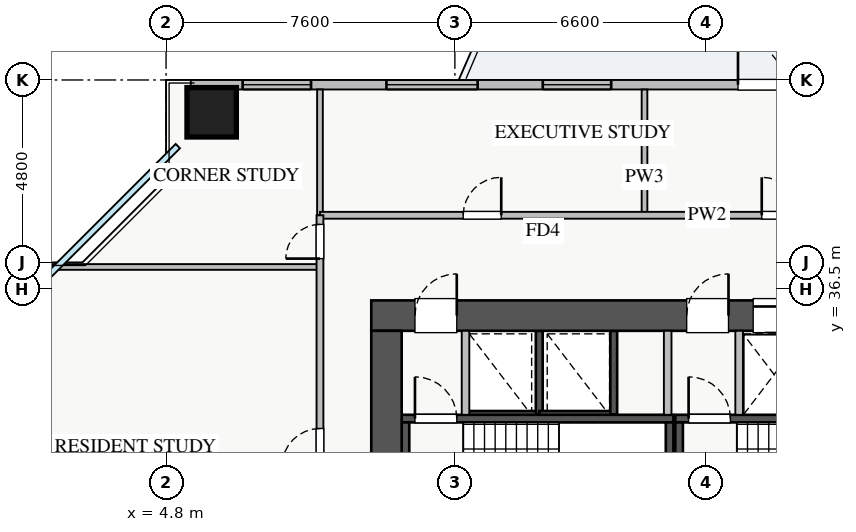
"""IFC4 building model, lengths in metres.
Left out: names, types, materials, properties, quantities, classifications, styles, units other than length and angle.
Written with IfcOpenShell. Run it as: python <this file> out.ifc"""

import sys

from ifc_helpers import new_model, si_unit, direction, frame, frame_2d, origin, origin_2d, place, context, subcontext, project, spatial, rectangle, extrude, source, transform, mapped, element, fill, save


model = new_model("IFC4")
c1 = context("Model", 3, precision=1e-05, world=origin(), true_north=direction((0.0, 1.0)))
c2 = subcontext(c1, "Body", "Model", "MODEL_VIEW")
j1 = project(units=[si_unit("LENGTHUNIT", "METRE"), si_unit("PLANEANGLEUNIT", "RADIAN")], contexts=[c1])
p1 = place(None, origin())
s1 = spatial("IfcSite", under=j1, at=p1, CompositionType="ELEMENT")
p2 = place(p1, origin())
s2 = spatial("IfcBuilding", under=s1, at=p2, CompositionType="ELEMENT")
p3 = place(p2, frame((0.0, 0.0, 32.75)))
s3 = spatial("IfcBuildingStorey", under=s2, at=p3, CompositionType="ELEMENT", Elevation=32.75)
p4 = place(p3, frame((12.68, 33.2, 0.0), z_axis=(0.0, 0.0, 1.0), x_axis=(1.0, 0.0, 0.0)))
e1 = element("IfcWall", 1, at=p4, inside=s3, PredefinedType="SHEAR", context=c2, shape_type="SweptSolid", body=[
    extrude(rectangle(XDim=1.94, YDim=0.18, at=frame_2d((0.97, 0.0))), origin(), (0.0, 0.0, 1.0), 3.07),
])
p5 = place(p3, frame((14.62, 33.2, 0.0), z_axis=(0.0, 0.0, 1.0), x_axis=(0.0, 1.0, 0.0)))
e2 = element("IfcWall", 2, at=p5, inside=s3, PredefinedType="SHEAR", context=c2, shape_type="SweptSolid", body=[
    extrude(rectangle(XDim=2.2, YDim=0.18, at=frame_2d((1.1, 0.0))), origin(), (0.0, 0.0, 1.0), 3.07),
])
p6 = place(p3, frame((14.62, 33.2, 0.0), z_axis=(0.0, 0.0, 1.0), x_axis=(1.0, 0.0, 0.0)))
e3 = element("IfcWall", 3, at=p6, inside=s3, PredefinedType="SHEAR", context=c2, shape_type="SweptSolid", body=[
    extrude(rectangle(XDim=1.96, YDim=0.18, at=frame_2d((0.98, 0.0))), origin(), (0.0, 0.0, 1.0), 3.07),
])
p7 = place(p3, frame((16.58, 33.2, 0.0), z_axis=(0.0, 0.0, 1.0), x_axis=(0.0, 1.0, 0.0)))
e4 = element("IfcWall", 4, at=p7, inside=s3, PredefinedType="SHEAR", context=c2, shape_type="SweptSolid", body=[
    extrude(rectangle(XDim=2.2, YDim=0.18, at=frame_2d((1.1, 0.0))), origin(), (0.0, 0.0, 1.0), 3.07),
])
p8 = place(p3, frame((19.88, 33.2, 0.0), z_axis=(0.0, 0.0, 1.0), x_axis=(1.0, 0.0, 0.0)))
e5 = element("IfcWall", 5, at=p8, inside=s3, PredefinedType="SHEAR", context=c2, shape_type="SweptSolid", body=[
    extrude(rectangle(XDim=1.87, YDim=0.18, at=frame_2d((0.935, 0.0))), origin(), (0.0, 0.0, 1.0), 3.07),
])
p9 = place(p3, frame((11.0, 33.09, 0.0), z_axis=(0.0, 0.0, 1.0), x_axis=(1.0, 0.0, 0.0)))
e6 = element("IfcWall", 6, at=p9, inside=s3, PredefinedType="SHEAR", context=c2, shape_type="SweptSolid", body=[
    extrude(rectangle(XDim=7.15, YDim=0.2, at=frame_2d((3.575, 0.0))), origin(), (0.0, 0.0, 1.0), 3.25),
])
p10 = place(p9, frame((0.35, 0.0, 0.0)))
e7 = element("IfcOpeningElement", 7, at=p10, cuts=e6, PredefinedType="OPENING", context=c2, shape_type="SweptSolid", body=[
    extrude(rectangle(XDim=1.1, YDim=2.05, at=frame_2d((0.55, 1.025))), frame((0.0, 0.11, 0.0), z_axis=(0.0, -1.0, 0.0), x_axis=(1.0, 0.0, 0.0)), (0.0, 0.0, 1.0), 0.22),
])
for number, where, z_axis, x_axis in (
    (8, (11.1, 30.05, 0.0), (0.0, 0.0, 1.0), (0.0, 1.0, 0.0)),
    (9, (18.05, 30.05, 0.0), (0.0, 0.0, 1.0), (0.0, 1.0, 0.0)),
):
    element("IfcWall", number, at=place(p3, frame(where, z_axis=z_axis, x_axis=x_axis)), inside=s3, PredefinedType="SHEAR", context=c2, shape_type="SweptSolid", body=[
        extrude(rectangle(XDim=2.94, YDim=0.2, at=frame_2d((1.47, 0.0))), origin(), (0.0, 0.0, 1.0), 3.25),
    ])
p11 = place(p3, frame((18.2, 33.09, 0.0), z_axis=(0.0, 0.0, 1.0), x_axis=(1.0, 0.0, 0.0)))
e10 = element("IfcWall", 10, at=p11, inside=s3, PredefinedType="SHEAR", context=c2, shape_type="SweptSolid", body=[
    extrude(rectangle(XDim=7.15, YDim=0.2, at=frame_2d((3.575, 0.0))), origin(), (0.0, 0.0, 1.0), 3.25),
])
p12 = place(p11, frame((0.35, 0.0, 0.0)))
e11 = element("IfcOpeningElement", 11, at=p12, cuts=e10, PredefinedType="OPENING", context=c2, shape_type="SweptSolid", body=[
    extrude(rectangle(XDim=1.1, YDim=2.05, at=frame_2d((0.55, 1.025))), frame((0.0, 0.11, 0.0), z_axis=(0.0, -1.0, 0.0), x_axis=(1.0, 0.0, 0.0)), (0.0, 0.0, 1.0), 0.22),
])
p13 = place(p3, frame((18.3, 30.05, 0.0), z_axis=(0.0, 0.0, 1.0), x_axis=(0.0, 1.0, 0.0)))
e12 = element("IfcWall", 12, at=p13, inside=s3, PredefinedType="SHEAR", context=c2, shape_type="SweptSolid", body=[
    extrude(rectangle(XDim=2.94, YDim=0.2, at=frame_2d((1.47, 0.0))), origin(), (0.0, 0.0, 1.0), 3.25),
])
p14 = place(p3, frame((10.2, 35.8, 0.0), z_axis=(0.0, 0.0, 1.0), x_axis=(1.0, 0.0, 0.0)))
e13 = element("IfcWall", 13, at=p14, inside=s3, PredefinedType="SHEAR", context=c2, shape_type="SweptSolid", body=[
    extrude(rectangle(XDim=17.6, YDim=0.8, at=frame_2d((8.8, 0.0))), origin(), (0.0, 0.0, 1.0), 3.25),
])
p15 = place(p14, frame((1.15, 0.0, 0.0)))
e14 = element("IfcOpeningElement", 14, at=p15, cuts=e13, PredefinedType="OPENING", context=c2, shape_type="SweptSolid", body=[
    extrude(rectangle(XDim=1.1, YDim=2.05, at=frame_2d((0.55, 1.025))), frame((0.0, 0.41, 0.0), z_axis=(0.0, -1.0, 0.0), x_axis=(1.0, 0.0, 0.0)), (0.0, 0.0, 1.0), 0.82),
])
p16 = place(p14, frame((8.3, 0.0, 0.0)))
e15 = element("IfcOpeningElement", 15, at=p16, cuts=e13, PredefinedType="OPENING", context=c2, shape_type="SweptSolid", body=[
    extrude(rectangle(XDim=1.1, YDim=2.05, at=frame_2d((0.55, 1.025))), frame((0.0, 0.41, 0.0), z_axis=(0.0, -1.0, 0.0), x_axis=(1.0, 0.0, 0.0)), (0.0, 0.0, 1.0), 0.82),
])
p17 = place(p14, frame((10.05, 0.0, 0.0)))
e16 = element("IfcOpeningElement", 16, at=p17, cuts=e13, PredefinedType="OPENING", context=c2, shape_type="SweptSolid", body=[
    extrude(rectangle(XDim=1.1, YDim=2.05, at=frame_2d((0.55, 1.025))), frame((0.0, 0.41, 0.0), z_axis=(0.0, -1.0, 0.0), x_axis=(1.0, 0.0, 0.0)), (0.0, 0.0, 1.0), 0.82),
])
p18 = place(p14, frame((14.74, 0.0, 0.0)))
e17 = element("IfcOpeningElement", 17, at=p18, cuts=e13, PredefinedType="OPENING", context=c2, shape_type="SweptSolid", body=[
    extrude(rectangle(XDim=1.0, YDim=2.05, at=frame_2d((0.5, 1.025))), frame((0.0, 0.41, 0.0), z_axis=(0.0, -1.0, 0.0), x_axis=(1.0, 0.0, 0.0)), (0.0, 0.0, 1.0), 0.82),
])
p19 = place(p14, frame((11.95, 0.0, 0.0)))
e18 = element("IfcOpeningElement", 18, at=p19, cuts=e13, PredefinedType="OPENING", context=c2, shape_type="SweptSolid", body=[
    extrude(rectangle(XDim=1.0, YDim=2.05, at=frame_2d((0.5, 1.025))), frame((0.0, 0.41, 0.0), z_axis=(0.0, -1.0, 0.0), x_axis=(1.0, 0.0, 0.0)), (0.0, 0.0, 1.0), 0.82),
])
p20 = place(p14, frame((13.485, 0.0, 0.0)))
e19 = element("IfcOpeningElement", 19, at=p20, cuts=e13, PredefinedType="OPENING", context=c2, shape_type="SweptSolid", body=[
    extrude(rectangle(XDim=1.0, YDim=2.05, at=frame_2d((0.5, 1.025))), frame((0.0, 0.41, 0.0), z_axis=(0.0, -1.0, 0.0), x_axis=(1.0, 0.0, 0.0)), (0.0, 0.0, 1.0), 0.82),
])
p21 = place(p3, frame((10.6, 29.8, 0.0), z_axis=(0.0, 0.0, 1.0), x_axis=(0.0, 1.0, 0.0)))
e20 = element("IfcWall", 20, at=p21, inside=s3, PredefinedType="SHEAR", context=c2, shape_type="SweptSolid", body=[
    extrude(rectangle(XDim=5.6, YDim=0.8, at=frame_2d((2.8, 0.0))), origin(), (0.0, 0.0, 1.0), 3.25),
])
m1 = source(origin(), c2, "Body", "SweptSolid", [
    extrude(rectangle(XDim=1.3, YDim=1.3, at=origin_2d()), origin(), (0.0, 0.0, 1.0), 3.25),
])
p22 = place(p3, frame((6.0, 41.15, 0.0), z_axis=(0.0, 0.0, 1.0), x_axis=(1.0, 0.0, 0.0)))
e21 = element("IfcColumn", 21, at=p22, inside=s3, PredefinedType="COLUMN", context=c2, shape_type="MappedRepresentation", body=[
    mapped(m1, transform((0.0, 0.0, 0.0), x_axis=(1.0, 0.0, 0.0), y_axis=(0.0, 1.0, 0.0), z_axis=(0.0, 0.0, 1.0), scale=1.0)),
])
p23 = place(p3, frame((5.45, 41.875, 0.0), z_axis=(0.0, 0.0, 1.0), x_axis=(1.0, 0.0, 0.0)))
e22 = element("IfcWall", 22, at=p23, inside=s3, PredefinedType="STANDARD", context=c2, shape_type="SweptSolid", body=[
    extrude(rectangle(XDim=27.1, YDim=0.25, at=frame_2d((13.55, 0.0))), origin(), (0.0, 0.0, 1.0), 2.61),
])
p24 = place(p23, frame((14.4, 0.0, 0.0)))
e23 = element("IfcOpeningElement", 23, at=p24, cuts=e22, PredefinedType="OPENING", context=c2, shape_type="SweptSolid", body=[
    extrude(rectangle(XDim=1.2, YDim=2.1, at=frame_2d((0.6, 1.05))), frame((0.0, 0.135, 0.0), z_axis=(0.0, -1.0, 0.0), x_axis=(1.0, 0.0, 0.0)), (0.0, 0.0, 1.0), 0.27),
])
p25 = place(p23, frame((1.365, 0.0, 0.9)))
e24 = element("IfcOpeningElement", 24, at=p25, cuts=e22, PredefinedType="OPENING", context=c2, shape_type="SweptSolid", body=[
    extrude(rectangle(XDim=1.8, YDim=1.5, at=frame_2d((0.9, 0.75))), frame((0.0, 0.135, 0.0), z_axis=(0.0, -1.0, 0.0), x_axis=(1.0, 0.0, 0.0)), (0.0, 0.0, 1.0), 0.27),
])
p26 = place(p23, frame((9.263, 0.0, 0.9)))
e25 = element("IfcOpeningElement", 25, at=p26, cuts=e22, PredefinedType="OPENING", context=c2, shape_type="SweptSolid", body=[
    extrude(rectangle(XDim=1.8, YDim=1.45, at=frame_2d((0.9, 0.725))), frame((0.0, 0.135, 0.0), z_axis=(0.0, -1.0, 0.0), x_axis=(1.0, 0.0, 0.0)), (0.0, 0.0, 1.0), 0.27),
])
p27 = place(p23, frame((16.188, 0.0, 0.9)))
e26 = element("IfcOpeningElement", 26, at=p27, cuts=e22, PredefinedType="OPENING", context=c2, shape_type="SweptSolid", body=[
    extrude(rectangle(XDim=1.5, YDim=1.45, at=frame_2d((0.75, 0.725))), frame((0.0, 0.135, 0.0), z_axis=(0.0, -1.0, 0.0), x_axis=(1.0, 0.0, 0.0)), (0.0, 0.0, 1.0), 0.27),
])
p28 = place(p23, frame((22.663, 0.0, 0.9)))
e27 = element("IfcOpeningElement", 27, at=p28, cuts=e22, PredefinedType="OPENING", context=c2, shape_type="SweptSolid", body=[
    extrude(rectangle(XDim=2.1, YDim=1.48, at=frame_2d((1.05, 0.74))), frame((0.0, 0.135, 0.0), z_axis=(0.0, -1.0, 0.0), x_axis=(1.0, 0.0, 0.0)), (0.0, 0.0, 1.0), 0.27),
])
p29 = place(p23, frame((5.149, 0.0, 0.9)))
e28 = element("IfcOpeningElement", 28, at=p29, cuts=e22, PredefinedType="OPENING", context=c2, shape_type="SweptSolid", body=[
    extrude(rectangle(XDim=2.4, YDim=1.5, at=frame_2d((1.2, 0.75))), frame((0.0, 0.135, 0.0), z_axis=(0.0, -1.0, 0.0), x_axis=(1.0, 0.0, 0.0)), (0.0, 0.0, 1.0), 0.27),
])
for number, where, z_axis, x_axis in (
    (29, (12.68, 33.19, 0.0), (0.0, 0.0, 1.0), (0.0, 1.0, 0.0)),
    (30, (18.0, 33.19, 0.0), (0.0, 0.0, 1.0), (0.0, 1.0, 0.0)),
    (31, (19.88, 33.19, 0.0), (0.0, 0.0, 1.0), (0.0, 1.0, 0.0)),
):
    element("IfcWall", number, at=place(p3, frame(where, z_axis=z_axis, x_axis=x_axis)), inside=s3, PredefinedType="PARTITIONING", context=c2, shape_type="SweptSolid", body=[
        extrude(rectangle(XDim=2.21, YDim=0.2, at=frame_2d((1.105, 0.0))), origin(), (0.0, 0.0, 1.0), 3.07),
    ])
for number, where, z_axis, x_axis in (
    (32, (17.39, 38.44, 0.0), (0.0, 0.0, 1.0), (0.0, 1.0, 0.0)),
    (33, (8.85, 38.44, 0.0), (0.0, 0.0, 1.0), (0.0, 1.0, 0.0)),
):
    element("IfcWall", number, at=place(p3, frame(where, z_axis=z_axis, x_axis=x_axis)), inside=s3, PredefinedType="PARTITIONING", context=c2, shape_type="SweptSolid", body=[
        extrude(rectangle(XDim=3.31, YDim=0.15, at=frame_2d((1.655, 0.0))), origin(), (0.0, 0.0, 1.0), 3.07),
    ])
p30 = place(p3, frame((8.85, 38.44, 0.0), z_axis=(0.0, 0.0, 1.0), x_axis=(1.0, 0.0, 0.0)))
e34 = element("IfcWall", 34, at=p30, inside=s3, PredefinedType="PARTITIONING", context=c2, shape_type="SweptSolid", body=[
    extrude(rectangle(XDim=23.57, YDim=0.18, at=frame_2d((11.785, 0.0))), origin(), (0.0, 0.0, 1.0), 3.07),
])
p31 = place(p30, frame((3.77, 0.0, 0.0)))
e35 = element("IfcOpeningElement", 35, at=p31, cuts=e34, PredefinedType="OPENING", context=c2, shape_type="SweptSolid", body=[
    extrude(rectangle(XDim=1.0, YDim=2.05, at=frame_2d((0.5, 1.025))), frame((0.0, 0.1, 0.0), z_axis=(0.0, -1.0, 0.0), x_axis=(1.0, 0.0, 0.0)), (0.0, 0.0, 1.0), 0.2),
])
p32 = place(p30, frame((11.625, 0.0, 0.0)))
e36 = element("IfcOpeningElement", 36, at=p32, cuts=e34, PredefinedType="OPENING", context=c2, shape_type="SweptSolid", body=[
    extrude(rectangle(XDim=1.0, YDim=2.05, at=frame_2d((0.5, 1.025))), frame((0.0, 0.1, 0.0), z_axis=(0.0, -1.0, 0.0), x_axis=(1.0, 0.0, 0.0)), (0.0, 0.0, 1.0), 0.2),
])
p33 = place(p30, frame((19.14, 0.0, 0.0)))
e37 = element("IfcOpeningElement", 37, at=p33, cuts=e34, PredefinedType="OPENING", context=c2, shape_type="SweptSolid", body=[
    extrude(rectangle(XDim=1.0, YDim=2.05, at=frame_2d((0.5, 1.025))), frame((0.0, 0.1, 0.0), z_axis=(0.0, -1.0, 0.0), x_axis=(1.0, 0.0, 0.0)), (0.0, 0.0, 1.0), 0.2),
])
p34 = place(p3, frame((0.25, 37.08, 0.0), z_axis=(0.0, 0.0, 1.0), x_axis=(1.0, 0.0, 0.0)))
e38 = element("IfcWall", 38, at=p34, inside=s3, PredefinedType="PARTITIONING", context=c2, shape_type="SweptSolid", body=[
    extrude(rectangle(XDim=8.6, YDim=0.15, at=frame_2d((4.3, 0.0))), origin(), (0.0, 0.0, 1.0), 3.07),
])
p35 = place(p3, frame((8.85, 7.21, 0.0), z_axis=(0.0, 0.0, 1.0), x_axis=(0.0, 1.0, 0.0)))
e39 = element("IfcWall", 39, at=p35, inside=s3, PredefinedType="PARTITIONING", context=c2, shape_type="SweptSolid", body=[
    extrude(rectangle(XDim=31.23, YDim=0.18, at=frame_2d((15.615, 0.0))), origin(), (0.0, 0.0, 1.0), 3.07),
])
p36 = place(p35, frame((30.09, 0.0, 0.0)))
e40 = element("IfcOpeningElement", 40, at=p36, cuts=e39, PredefinedType="OPENING", context=c2, shape_type="SweptSolid", body=[
    extrude(rectangle(XDim=0.9, YDim=2.05, at=frame_2d((0.45, 1.025))), frame((0.0, 0.1, 0.0), z_axis=(0.0, -1.0, 0.0), x_axis=(1.0, 0.0, 0.0)), (0.0, 0.0, 1.0), 0.2),
])
p37 = place(p35, frame((0.24, 0.0, 0.0)))
e41 = element("IfcOpeningElement", 41, at=p37, cuts=e39, PredefinedType="OPENING", context=c2, shape_type="SweptSolid", body=[
    extrude(rectangle(XDim=0.9, YDim=2.05, at=frame_2d((0.45, 1.025))), frame((0.0, 0.1, 0.0), z_axis=(0.0, -1.0, 0.0), x_axis=(1.0, 0.0, 0.0)), (0.0, 0.0, 1.0), 0.2),
])
p38 = place(p35, frame((3.06, 0.0, 0.0)))
e42 = element("IfcOpeningElement", 42, at=p38, cuts=e39, PredefinedType="OPENING", context=c2, shape_type="SweptSolid", body=[
    extrude(rectangle(XDim=1.0, YDim=2.05, at=frame_2d((0.5, 1.025))), frame((0.0, 0.1, 0.0), z_axis=(0.0, -1.0, 0.0), x_axis=(1.0, 0.0, 0.0)), (0.0, 0.0, 1.0), 0.2),
])
p39 = place(p35, frame((12.795, 0.0, 0.0)))
e43 = element("IfcOpeningElement", 43, at=p39, cuts=e39, PredefinedType="OPENING", context=c2, shape_type="SweptSolid", body=[
    extrude(rectangle(XDim=1.0, YDim=2.05, at=frame_2d((0.5, 1.025))), frame((0.0, 0.1, 0.0), z_axis=(0.0, -1.0, 0.0), x_axis=(1.0, 0.0, 0.0)), (0.0, 0.0, 1.0), 0.2),
])
p40 = place(p35, frame((24.62, 0.0, 0.0)))
e44 = element("IfcOpeningElement", 44, at=p40, cuts=e39, PredefinedType="OPENING", context=c2, shape_type="SweptSolid", body=[
    extrude(rectangle(XDim=1.0, YDim=2.05, at=frame_2d((0.5, 1.025))), frame((0.0, 0.1, 0.0), z_axis=(0.0, -1.0, 0.0), x_axis=(1.0, 0.0, 0.0)), (0.0, 0.0, 1.0), 0.2),
])
m2 = source(origin(), c2, "Body", "SweptSolid", [
    extrude(rectangle(XDim=1.2, YDim=2.1, at=frame_2d((0.6, 1.05))), frame((0.0, 0.025, 0.0), z_axis=(0.0, -1.0, 0.0), x_axis=(1.0, 0.0, 0.0)), (0.0, 0.0, 1.0), 0.05),
])
p41 = place(p24, origin())
e45 = element("IfcDoor", 45, at=p41, inside=s3, OperationType="SINGLE_SWING_LEFT", PredefinedType="DOOR", context=c2, shape_type="MappedRepresentation", body=[
    mapped(m2, transform((0.0, 0.0, 0.0), x_axis=(1.0, 0.0, 0.0), y_axis=(0.0, 1.0, 0.0), z_axis=(0.0, 0.0, 1.0), scale=1.0)),
])
fill(e23, e45)
m3 = source(origin(), c2, "Body", "SweptSolid", [
    extrude(rectangle(XDim=1.8, YDim=1.5, at=frame_2d((0.9, 0.75))), frame((0.0, 0.03, 0.0), z_axis=(0.0, -1.0, 0.0), x_axis=(1.0, 0.0, 0.0)), (0.0, 0.0, 1.0), 0.06),
])
p42 = place(p25, origin())
e46 = element("IfcWindow", 46, at=p42, inside=s3, PartitioningType="TRIPLE_PANEL_VERTICAL", PredefinedType="WINDOW", context=c2, shape_type="MappedRepresentation", body=[
    mapped(m3, transform((0.0, 0.0, 0.0), x_axis=(1.0, 0.0, 0.0), y_axis=(0.0, 1.0, 0.0), z_axis=(0.0, 0.0, 1.0), scale=1.0)),
])
fill(e24, e46)
m4 = source(origin(), c2, "Body", "SweptSolid", [
    extrude(rectangle(XDim=1.8, YDim=1.45, at=frame_2d((0.9, 0.725))), frame((0.0, 0.03, 0.0), z_axis=(0.0, -1.0, 0.0), x_axis=(1.0, 0.0, 0.0)), (0.0, 0.0, 1.0), 0.06),
])
p43 = place(p26, origin())
e47 = element("IfcWindow", 47, at=p43, inside=s3, PartitioningType="DOUBLE_PANEL_VERTICAL", PredefinedType="WINDOW", context=c2, shape_type="MappedRepresentation", body=[
    mapped(m4, transform((0.0, 0.0, 0.0), x_axis=(1.0, 0.0, 0.0), y_axis=(0.0, 1.0, 0.0), z_axis=(0.0, 0.0, 1.0), scale=1.0)),
])
fill(e25, e47)
m5 = source(origin(), c2, "Body", "SweptSolid", [
    extrude(rectangle(XDim=1.1, YDim=2.05, at=frame_2d((0.55, 1.025))), frame((0.0, 0.025, 0.0), z_axis=(0.0, -1.0, 0.0), x_axis=(1.0, 0.0, 0.0)), (0.0, 0.0, 1.0), 0.05),
])
p44 = place(p15, origin())
e48 = element("IfcDoor", 48, at=p44, inside=s3, OperationType="SINGLE_SWING_RIGHT", PredefinedType="DOOR", context=c2, shape_type="MappedRepresentation", body=[
    mapped(m5, transform((0.0, 0.0, 0.0), x_axis=(1.0, 0.0, 0.0), y_axis=(0.0, 1.0, 0.0), z_axis=(0.0, 0.0, 1.0), scale=1.0)),
])
fill(e14, e48)
p45 = place(p10, origin())
e49 = element("IfcDoor", 49, at=p45, inside=s3, OperationType="SINGLE_SWING_LEFT", PredefinedType="DOOR", context=c2, shape_type="MappedRepresentation", body=[
    mapped(m5, transform((0.0, 0.0, 0.0), x_axis=(1.0, 0.0, 0.0), y_axis=(0.0, 1.0, 0.0), z_axis=(0.0, 0.0, 1.0), scale=1.0)),
])
fill(e7, e49)
p46 = place(p16, origin())
e50 = element("IfcDoor", 50, at=p46, inside=s3, OperationType="SINGLE_SWING_RIGHT", PredefinedType="DOOR", context=c2, shape_type="MappedRepresentation", body=[
    mapped(m5, transform((0.0, 0.0, 0.0), x_axis=(1.0, 0.0, 0.0), y_axis=(0.0, 1.0, 0.0), z_axis=(0.0, 0.0, 1.0), scale=1.0)),
])
fill(e15, e50)
p47 = place(p12, origin())
e51 = element("IfcDoor", 51, at=p47, inside=s3, OperationType="SINGLE_SWING_LEFT", PredefinedType="DOOR", context=c2, shape_type="MappedRepresentation", body=[
    mapped(m5, transform((0.0, 0.0, 0.0), x_axis=(1.0, 0.0, 0.0), y_axis=(0.0, 1.0, 0.0), z_axis=(0.0, 0.0, 1.0), scale=1.0)),
])
fill(e11, e51)
p48 = place(p17, origin())
e52 = element("IfcDoor", 52, at=p48, inside=s3, OperationType="SLIDING_TO_LEFT", PredefinedType="DOOR", context=c2, shape_type="MappedRepresentation", body=[
    mapped(m5, transform((0.0, 0.0, 0.0), x_axis=(1.0, 0.0, 0.0), y_axis=(0.0, 1.0, 0.0), z_axis=(0.0, 0.0, 1.0), scale=1.0)),
])
fill(e16, e52)
m6 = source(origin(), c2, "Body", "SweptSolid", [
    extrude(rectangle(XDim=1.0, YDim=2.05, at=frame_2d((0.5, 1.025))), frame((0.0, 0.025, 0.0), z_axis=(0.0, -1.0, 0.0), x_axis=(1.0, 0.0, 0.0)), (0.0, 0.0, 1.0), 0.05),
])
p49 = place(p31, origin())
e53 = element("IfcDoor", 53, at=p49, inside=s3, OperationType="SINGLE_SWING_RIGHT", PredefinedType="DOOR", context=c2, shape_type="MappedRepresentation", body=[
    mapped(m6, transform((0.0, 0.0, 0.0), x_axis=(1.0, 0.0, 0.0), y_axis=(0.0, 1.0, 0.0), z_axis=(0.0, 0.0, 1.0), scale=1.0)),
])
fill(e35, e53)
p50 = place(p32, origin())
e54 = element("IfcDoor", 54, at=p50, inside=s3, OperationType="SINGLE_SWING_LEFT", PredefinedType="DOOR", context=c2, shape_type="MappedRepresentation", body=[
    mapped(m6, transform((0.0, 0.0, 0.0), x_axis=(1.0, 0.0, 0.0), y_axis=(0.0, 1.0, 0.0), z_axis=(0.0, 0.0, 1.0), scale=1.0)),
])
fill(e36, e54)
m7 = source(origin(), c2, "Body", "SweptSolid", [
    extrude(rectangle(XDim=0.9, YDim=2.05, at=frame_2d((0.45, 1.025))), frame((0.0, 0.025, 0.0), z_axis=(0.0, -1.0, 0.0), x_axis=(1.0, 0.0, 0.0)), (0.0, 0.0, 1.0), 0.05),
])
p51 = place(p36, origin())
e55 = element("IfcDoor", 55, at=p51, inside=s3, OperationType="SINGLE_SWING_LEFT", PredefinedType="DOOR", context=c2, shape_type="MappedRepresentation", body=[
    mapped(m7, transform((0.0, 0.0, 0.0), x_axis=(1.0, 0.0, 0.0), y_axis=(0.0, 1.0, 0.0), z_axis=(0.0, 0.0, 1.0), scale=1.0)),
])
fill(e40, e55)
p52 = place(p40, origin())
e56 = element("IfcDoor", 56, at=p52, inside=s3, OperationType="SINGLE_SWING_LEFT", PredefinedType="DOOR", context=c2, shape_type="MappedRepresentation", body=[
    mapped(m6, transform((0.0, 0.0, 0.0), x_axis=(1.0, 0.0, 0.0), y_axis=(0.0, 1.0, 0.0), z_axis=(0.0, 0.0, 1.0), scale=1.0)),
])
fill(e44, e56)
m8 = source(origin(), c2, "Body", "SweptSolid", [
    extrude(rectangle(XDim=2.4, YDim=1.5, at=frame_2d((1.2, 0.75))), frame((0.0, 0.03, 0.0), z_axis=(0.0, -1.0, 0.0), x_axis=(1.0, 0.0, 0.0)), (0.0, 0.0, 1.0), 0.06),
])
p53 = place(p29, origin())
e57 = element("IfcWindow", 57, at=p53, inside=s3, PartitioningType="TRIPLE_PANEL_VERTICAL", PredefinedType="WINDOW", context=c2, shape_type="MappedRepresentation", body=[
    mapped(m8, transform((0.0, 0.0, 0.0), x_axis=(1.0, 0.0, 0.0), y_axis=(0.0, 1.0, 0.0), z_axis=(0.0, 0.0, 1.0), scale=1.0)),
])
fill(e28, e57)
save(model, sys.argv[1])
